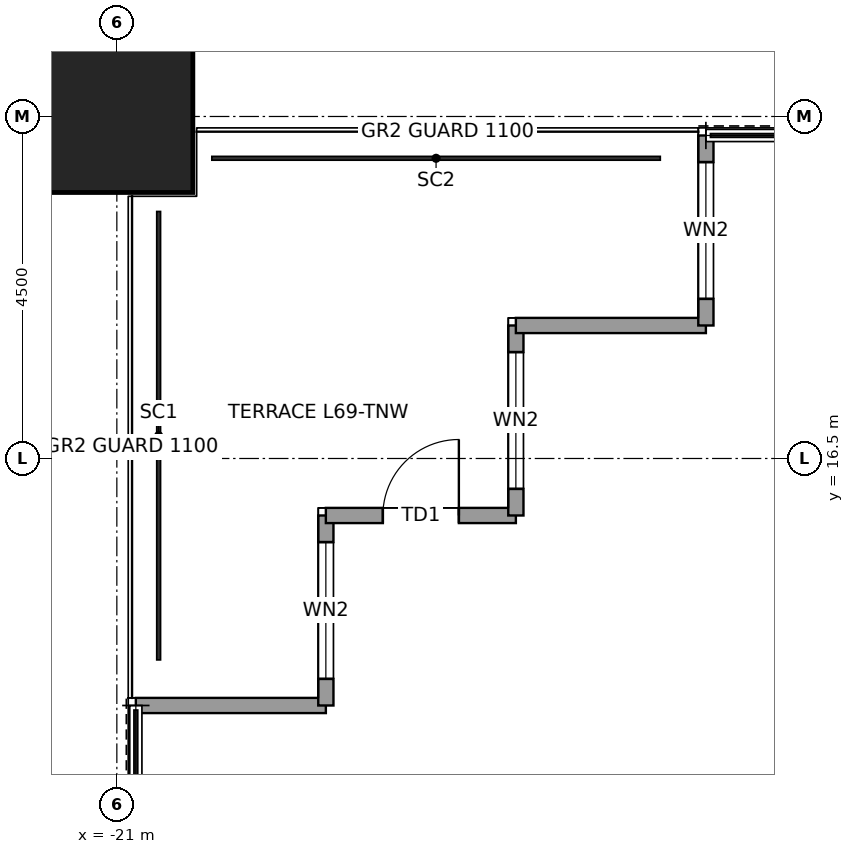
"""IFC4 building model, lengths in metres.
Left out: names, types, materials, properties, quantities, classifications, styles, units other than length and angle.
Written with IfcOpenShell. Run it as: python <this file> out.ifc"""

import sys

from ifc_helpers import new_model, si_unit, direction, frame, frame_2d, origin, origin_2d, place, context, subcontext, project, spatial, rectangle, hollow_rectangle, extrude, element, fill, save


model = new_model("IFC4")
c1 = context("Model", 3, precision=1e-05, world=origin(), true_north=direction((0.0, 1.0)))
c2 = subcontext(c1, "Body", "Model", "MODEL_VIEW")
j1 = project(units=[si_unit("LENGTHUNIT", "METRE"), si_unit("PLANEANGLEUNIT", "RADIAN")], contexts=[c1])
p1 = place(None, origin())
s1 = spatial("IfcSite", under=j1, at=p1, CompositionType="ELEMENT")
p2 = place(p1, origin())
s2 = spatial("IfcBuilding", under=s1, at=p2, CompositionType="ELEMENT")
p3 = place(p2, frame((0.0, 0.0, 311.9)))
s3 = spatial("IfcBuildingStorey", under=s2, at=p3, CompositionType="ELEMENT", Elevation=311.9)
p4 = place(p3, frame((-21.0, 21.0, 0.0), z_axis=(0.0, 0.0, 1.0), x_axis=(1.0, 0.0, 0.0)))
e1 = element("IfcColumn", 1, at=p4, inside=s3, PredefinedType="COLUMN", context=c2, shape_type="SweptSolid", body=[
    extrude(hollow_rectangle(XDim=2.0, YDim=2.0, WallThickness=0.095, at=origin_2d()), origin(), (0.0, 0.0, 1.0), 4.0),
])
p5 = place(p3, frame((-20.75, 13.25, 0.0), z_axis=(0.0, 0.0, 1.0), x_axis=(1.0, 0.0, 0.0)))
e2 = element("IfcWall", 2, at=p5, inside=s3, PredefinedType="SOLIDWALL", context=c2, shape_type="SweptSolid", body=[
    extrude(rectangle(XDim=2.5, YDim=0.2, at=frame_2d((1.25, 0.0))), origin(), (0.0, 0.0, 1.0), 3.85),
])
p6 = place(p3, frame((-18.25, 13.25, 0.0), z_axis=(0.0, 0.0, 1.0), x_axis=(0.0, 1.0, 0.0)))
e3 = element("IfcWall", 3, at=p6, inside=s3, PredefinedType="SOLIDWALL", context=c2, shape_type="SweptSolid", body=[
    extrude(rectangle(XDim=2.5, YDim=0.2, at=frame_2d((1.25, 0.0))), origin(), (0.0, 0.0, 1.0), 3.85),
])
p7 = place(p6, frame((0.35, 0.0, 0.3)))
e4 = element("IfcOpeningElement", 4, at=p7, cuts=e3, PredefinedType="OPENING", context=c2, shape_type="SweptSolid", body=[
    extrude(rectangle(XDim=1.8, YDim=2.4, at=frame_2d((0.9, 1.2))), frame((0.0, 0.11, 0.0), z_axis=(0.0, -1.0, 0.0), x_axis=(1.0, 0.0, 0.0)), (0.0, 0.0, 1.0), 0.22),
])
p8 = place(p3, frame((-18.25, 15.75, 0.0), z_axis=(0.0, 0.0, 1.0), x_axis=(1.0, 0.0, 0.0)))
e5 = element("IfcWall", 5, at=p8, inside=s3, PredefinedType="SOLIDWALL", context=c2, shape_type="SweptSolid", body=[
    extrude(rectangle(XDim=2.5, YDim=0.2, at=frame_2d((1.25, 0.0))), origin(), (0.0, 0.0, 1.0), 3.317),
])
p9 = place(p8, frame((0.75, 0.0, 0.0)))
e6 = element("IfcOpeningElement", 6, at=p9, cuts=e5, PredefinedType="OPENING", context=c2, shape_type="SweptSolid", body=[
    extrude(rectangle(XDim=1.0, YDim=2.4, at=frame_2d((0.5, 1.2))), frame((0.0, 0.11, 0.0), z_axis=(0.0, -1.0, 0.0), x_axis=(1.0, 0.0, 0.0)), (0.0, 0.0, 1.0), 0.22),
])
p10 = place(p3, frame((-15.75, 15.75, 0.0), z_axis=(0.0, 0.0, 1.0), x_axis=(0.0, 1.0, 0.0)))
e7 = element("IfcWall", 7, at=p10, inside=s3, PredefinedType="SOLIDWALL", context=c2, shape_type="SweptSolid", body=[
    extrude(rectangle(XDim=2.5, YDim=0.2, at=frame_2d((1.25, 0.0))), origin(), (0.0, 0.0, 1.0), 3.85),
])
p11 = place(p10, frame((0.35, 0.0, 0.3)))
e8 = element("IfcOpeningElement", 8, at=p11, cuts=e7, PredefinedType="OPENING", context=c2, shape_type="SweptSolid", body=[
    extrude(rectangle(XDim=1.8, YDim=2.4, at=frame_2d((0.9, 1.2))), frame((0.0, 0.11, 0.0), z_axis=(0.0, -1.0, 0.0), x_axis=(1.0, 0.0, 0.0)), (0.0, 0.0, 1.0), 0.22),
])
p12 = place(p3, frame((-15.75, 18.25, 0.0), z_axis=(0.0, 0.0, 1.0), x_axis=(1.0, 0.0, 0.0)))
e9 = element("IfcWall", 9, at=p12, inside=s3, PredefinedType="SOLIDWALL", context=c2, shape_type="SweptSolid", body=[
    extrude(rectangle(XDim=2.5, YDim=0.2, at=frame_2d((1.25, 0.0))), origin(), (0.0, 0.0, 1.0), 3.85),
])
p13 = place(p3, frame((-13.25, 18.25, 0.0), z_axis=(0.0, 0.0, 1.0), x_axis=(0.0, 1.0, 0.0)))
e10 = element("IfcWall", 10, at=p13, inside=s3, PredefinedType="SOLIDWALL", context=c2, shape_type="SweptSolid", body=[
    extrude(rectangle(XDim=2.5, YDim=0.2, at=frame_2d((1.25, 0.0))), origin(), (0.0, 0.0, 1.0), 3.85),
])
p14 = place(p13, frame((0.35, 0.0, 0.3)))
e11 = element("IfcOpeningElement", 11, at=p14, cuts=e10, PredefinedType="OPENING", context=c2, shape_type="SweptSolid", body=[
    extrude(rectangle(XDim=1.8, YDim=2.4, at=frame_2d((0.9, 1.2))), frame((0.0, 0.11, 0.0), z_axis=(0.0, -1.0, 0.0), x_axis=(1.0, 0.0, 0.0)), (0.0, 0.0, 1.0), 0.22),
])
p15 = place(p7, origin())
e12 = element("IfcWindow", 12, at=p15, inside=s3, PartitioningType="SINGLE_PANEL", PredefinedType="WINDOW", context=c2, shape_type="SweptSolid", body=[
    extrude(rectangle(XDim=1.8, YDim=2.4, at=frame_2d((0.9, 1.2))), frame((0.0, 0.03, 0.0), z_axis=(0.0, -1.0, 0.0), x_axis=(1.0, 0.0, 0.0)), (0.0, 0.0, 1.0), 0.06),
])
fill(e4, e12)
p16 = place(p9, origin())
e13 = element("IfcDoor", 13, at=p16, inside=s3, OperationType="SINGLE_SWING_RIGHT", PredefinedType="DOOR", context=c2, shape_type="SweptSolid", body=[
    extrude(rectangle(XDim=1.0, YDim=2.4, at=frame_2d((0.5, 1.2))), frame((0.0, 0.025, 0.0), z_axis=(0.0, -1.0, 0.0), x_axis=(1.0, 0.0, 0.0)), (0.0, 0.0, 1.0), 0.05),
])
fill(e6, e13)
p17 = place(p11, origin())
e14 = element("IfcWindow", 14, at=p17, inside=s3, PartitioningType="SINGLE_PANEL", PredefinedType="WINDOW", context=c2, shape_type="SweptSolid", body=[
    extrude(rectangle(XDim=1.8, YDim=2.4, at=frame_2d((0.9, 1.2))), frame((0.0, 0.03, 0.0), z_axis=(0.0, -1.0, 0.0), x_axis=(1.0, 0.0, 0.0)), (0.0, 0.0, 1.0), 0.06),
])
fill(e8, e14)
p18 = place(p14, origin())
e15 = element("IfcWindow", 15, at=p18, inside=s3, PartitioningType="SINGLE_PANEL", PredefinedType="WINDOW", context=c2, shape_type="SweptSolid", body=[
    extrude(rectangle(XDim=1.8, YDim=2.4, at=frame_2d((0.9, 1.2))), frame((0.0, 0.03, 0.0), z_axis=(0.0, -1.0, 0.0), x_axis=(1.0, 0.0, 0.0)), (0.0, 0.0, 1.0), 0.06),
])
fill(e11, e15)
save(model, sys.argv[1])
